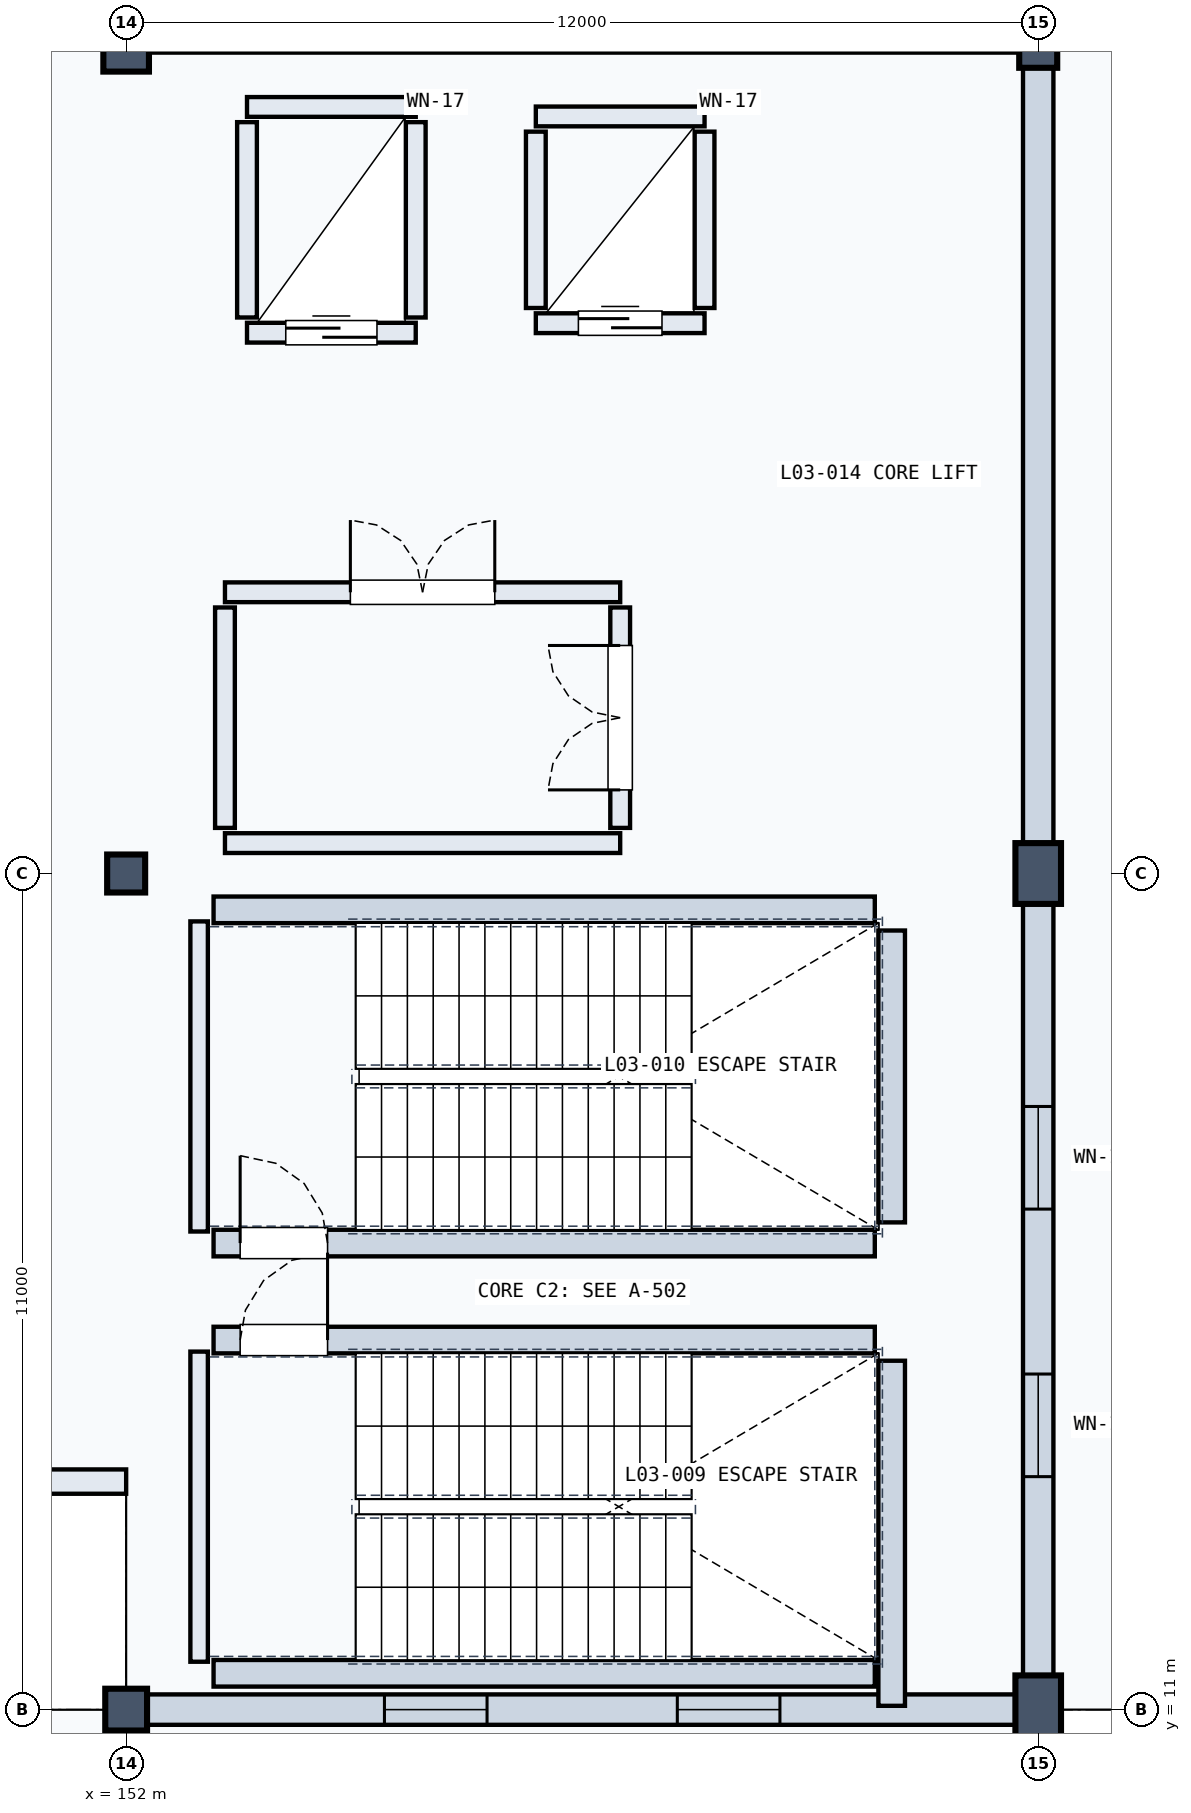
"""IFC4 building model, lengths in metres.
Left out: names, types, materials, properties, quantities, classifications, styles, units other than length and angle.
Written with IfcOpenShell. Run it as: python <this file> out.ifc"""

import sys

from ifc_helpers import new_model, si_unit, direction, frame, frame_2d, origin, origin_2d, place, context, subcontext, project, spatial, rectangle, extrude, element, fill, save


model = new_model("IFC4")
c1 = context("Model", 3, precision=1e-05, world=origin(), true_north=direction((0.0, 1.0)))
c2 = subcontext(c1, "Body", "Model", "MODEL_VIEW")
j1 = project(units=[si_unit("LENGTHUNIT", "METRE"), si_unit("PLANEANGLEUNIT", "RADIAN")], contexts=[c1])
p1 = place(None, origin())
s1 = spatial("IfcSite", under=j1, at=p1, CompositionType="ELEMENT")
p2 = place(p1, origin())
s2 = spatial("IfcBuilding", under=s1, at=p2, CompositionType="ELEMENT")
p3 = place(p2, frame((0.0, 0.0, 14.7)))
s3 = spatial("IfcBuildingStorey", under=s2, at=p3, CompositionType="ELEMENT", Elevation=14.7)
p4 = place(p3, frame((152.0, 11.0, 0.0), z_axis=(0.0, 0.0, 1.0), x_axis=(1.0, 0.0, 0.0)))
e1 = element("IfcColumn", 1, at=p4, inside=s3, PredefinedType="COLUMN", context=c2, shape_type="SweptSolid", body=[
    extrude(rectangle(XDim=0.55, YDim=0.55, at=origin_2d()), origin(), (0.0, 0.0, 1.0), 4.8),
])
p5 = place(p3, frame((152.0, 22.0, 0.0), z_axis=(0.0, 0.0, 1.0), x_axis=(1.0, 0.0, 0.0)))
e2 = element("IfcColumn", 2, at=p5, inside=s3, PredefinedType="COLUMN", context=c2, shape_type="SweptSolid", body=[
    extrude(rectangle(XDim=0.5, YDim=0.5, at=origin_2d()), origin(), (0.0, 0.0, 1.0), 4.8),
])
for number, where, z_axis, x_axis in (
    (3, (152.0, 33.0, 0.0), (0.0, 0.0, 1.0), (1.0, 0.0, 0.0)),
    (4, (164.0, 11.0, 0.0), (0.0, 0.0, 1.0), (1.0, 0.0, 0.0)),
):
    element("IfcColumn", number, at=place(p3, frame(where, z_axis=z_axis, x_axis=x_axis)), inside=s3, PredefinedType="COLUMN", context=c2, shape_type="SweptSolid", body=[
        extrude(rectangle(XDim=0.6, YDim=0.9, at=origin_2d()), origin(), (0.0, 0.0, 1.0), 4.8),
    ])
p6 = place(p3, frame((164.0, 22.0, 0.0), z_axis=(0.0, 0.0, 1.0), x_axis=(1.0, 0.0, 0.0)))
e5 = element("IfcColumn", 5, at=p6, inside=s3, PredefinedType="COLUMN", context=c2, shape_type="SweptSolid", body=[
    extrude(rectangle(XDim=0.6, YDim=0.8, at=origin_2d()), origin(), (0.0, 0.0, 1.0), 4.8),
])
p7 = place(p3, frame((164.0, 33.0, 0.0), z_axis=(0.0, 0.0, 1.0), x_axis=(1.0, 0.0, 0.0)))
e6 = element("IfcColumn", 6, at=p7, inside=s3, PredefinedType="COLUMN", context=c2, shape_type="SweptSolid", body=[
    extrude(rectangle(XDim=0.5, YDim=0.8, at=origin_2d()), origin(), (0.0, 0.0, 1.0), 4.8),
])
p8 = place(p3, frame((143.426, 14.0, 0.0), z_axis=(0.0, 0.0, 1.0), x_axis=(1.0, 0.0, 0.0)))
e7 = element("IfcWall", 7, at=p8, inside=s3, PredefinedType="SOLIDWALL", context=c2, shape_type="SweptSolid", body=[
    extrude(rectangle(XDim=8.574, YDim=0.32, at=frame_2d((4.287, 0.0))), origin(), (0.0, 0.0, 1.0), 3.778),
])
p9 = place(p8, frame((2.587, 0.0, 0.9)))
e8 = element("IfcOpeningElement", 8, at=p9, cuts=e7, PredefinedType="OPENING", context=c2, shape_type="SweptSolid", body=[
    extrude(rectangle(XDim=3.4, YDim=1.75, at=frame_2d((1.7, 0.875))), frame((0.0, 0.17, 0.0), z_axis=(0.0, -1.0, 0.0), x_axis=(1.0, 0.0, 0.0)), (0.0, 0.0, 1.0), 0.34),
])
p10 = place(p3, frame((152.22, 11.0, 0.0), z_axis=(0.0, 0.0, 1.0), x_axis=(1.0, 0.0, 0.0)))
e9 = element("IfcWall", 9, at=p10, inside=s3, PredefinedType="SOLIDWALL", context=c2, shape_type="SweptSolid", body=[
    extrude(rectangle(XDim=11.56, YDim=0.4, at=frame_2d((5.78, 0.0))), origin(), (0.0, 0.0, 1.0), 3.778),
])
p11 = place(p10, frame((3.178, 0.0, 0.8)))
e10 = element("IfcOpeningElement", 10, at=p11, cuts=e9, PredefinedType="OPENING", context=c2, shape_type="SweptSolid", body=[
    extrude(rectangle(XDim=1.35, YDim=2.1, at=frame_2d((0.675, 1.05))), frame((0.0, 0.21, 0.0), z_axis=(0.0, -1.0, 0.0), x_axis=(1.0, 0.0, 0.0)), (0.0, 0.0, 1.0), 0.42),
])
p12 = place(p10, frame((7.032, 0.0, 0.8)))
e11 = element("IfcOpeningElement", 11, at=p12, cuts=e9, PredefinedType="OPENING", context=c2, shape_type="SweptSolid", body=[
    extrude(rectangle(XDim=1.35, YDim=2.1, at=frame_2d((0.675, 1.05))), frame((0.0, 0.21, 0.0), z_axis=(0.0, -1.0, 0.0), x_axis=(1.0, 0.0, 0.0)), (0.0, 0.0, 1.0), 0.42),
])
p13 = place(p3, frame((164.0, 11.22, 0.0), z_axis=(0.0, 0.0, 1.0), x_axis=(0.0, 1.0, 0.0)))
e12 = element("IfcWall", 12, at=p13, inside=s3, PredefinedType="SOLIDWALL", context=c2, shape_type="SweptSolid", body=[
    extrude(rectangle(XDim=10.56, YDim=0.4, at=frame_2d((5.28, 0.0))), origin(), (0.0, 0.0, 1.0), 3.79),
])
p14 = place(p13, frame((2.845, 0.0, 0.8)))
e13 = element("IfcOpeningElement", 13, at=p14, cuts=e12, PredefinedType="OPENING", context=c2, shape_type="SweptSolid", body=[
    extrude(rectangle(XDim=1.35, YDim=2.1, at=frame_2d((0.675, 1.05))), frame((0.0, 0.21, 0.0), z_axis=(0.0, -1.0, 0.0), x_axis=(1.0, 0.0, 0.0)), (0.0, 0.0, 1.0), 0.42),
])
p15 = place(p13, frame((6.365, 0.0, 0.8)))
e14 = element("IfcOpeningElement", 14, at=p15, cuts=e12, PredefinedType="OPENING", context=c2, shape_type="SweptSolid", body=[
    extrude(rectangle(XDim=1.35, YDim=2.1, at=frame_2d((0.675, 1.05))), frame((0.0, 0.21, 0.0), z_axis=(0.0, -1.0, 0.0), x_axis=(1.0, 0.0, 0.0)), (0.0, 0.0, 1.0), 0.42),
])
p16 = place(p3, frame((152.22, 33.0, 0.0), z_axis=(0.0, 0.0, 1.0), x_axis=(1.0, 0.0, 0.0)))
e15 = element("IfcWall", 15, at=p16, inside=s3, PredefinedType="SOLIDWALL", context=c2, shape_type="SweptSolid", body=[
    extrude(rectangle(XDim=11.56, YDim=0.4, at=frame_2d((5.78, 0.0))), origin(), (0.0, 0.0, 1.0), 3.79),
])
p17 = place(p16, frame((3.178, 0.0, 0.8)))
e16 = element("IfcOpeningElement", 16, at=p17, cuts=e15, PredefinedType="OPENING", context=c2, shape_type="SweptSolid", body=[
    extrude(rectangle(XDim=1.35, YDim=2.1, at=frame_2d((0.675, 1.05))), frame((0.0, 0.21, 0.0), z_axis=(0.0, -1.0, 0.0), x_axis=(1.0, 0.0, 0.0)), (0.0, 0.0, 1.0), 0.42),
])
p18 = place(p16, frame((7.032, 0.0, 0.8)))
e17 = element("IfcOpeningElement", 17, at=p18, cuts=e15, PredefinedType="OPENING", context=c2, shape_type="SweptSolid", body=[
    extrude(rectangle(XDim=1.35, YDim=2.1, at=frame_2d((0.675, 1.05))), frame((0.0, 0.21, 0.0), z_axis=(0.0, -1.0, 0.0), x_axis=(1.0, 0.0, 0.0)), (0.0, 0.0, 1.0), 0.42),
])
p19 = place(p3, frame((164.0, 22.22, 0.0), z_axis=(0.0, 0.0, 1.0), x_axis=(0.0, 1.0, 0.0)))
e18 = element("IfcWall", 18, at=p19, inside=s3, PredefinedType="SOLIDWALL", context=c2, shape_type="SweptSolid", body=[
    extrude(rectangle(XDim=10.56, YDim=0.4, at=frame_2d((5.28, 0.0))), origin(), (0.0, 0.0, 1.0), 3.79),
])
p20 = place(p3, frame((152.96, 11.63, 0.0), z_axis=(0.0, 0.0, 1.0), x_axis=(0.0, 1.0, 0.0)))
e19 = element("IfcWall", 19, at=p20, inside=s3, PredefinedType="SOLIDWALL", context=c2, shape_type="SweptSolid", body=[
    extrude(rectangle(XDim=4.08, YDim=0.23, at=frame_2d((2.04, 0.0))), origin(), (0.0, 0.0, 1.0), 4.46),
])
p21 = place(p3, frame((162.072, 11.05, 0.0), z_axis=(0.0, 0.0, 1.0), x_axis=(0.0, 1.0, 0.0)))
e20 = element("IfcWall", 20, at=p21, inside=s3, PredefinedType="SOLIDWALL", context=c2, shape_type="SweptSolid", body=[
    extrude(rectangle(XDim=4.54, YDim=0.35, at=frame_2d((2.27, 0.0))), origin(), (0.0, 0.0, 1.0), 4.46),
])
p22 = place(p3, frame((153.15, 11.478, 0.0), z_axis=(0.0, 0.0, 1.0), x_axis=(1.0, 0.0, 0.0)))
e21 = element("IfcWall", 21, at=p22, inside=s3, PredefinedType="SOLIDWALL", context=c2, shape_type="SweptSolid", body=[
    extrude(rectangle(XDim=8.7, YDim=0.35, at=frame_2d((4.35, 0.0))), origin(), (0.0, 0.0, 1.0), 4.46),
])
p23 = place(p3, frame((153.15, 15.862, 0.0), z_axis=(0.0, 0.0, 1.0), x_axis=(1.0, 0.0, 0.0)))
e22 = element("IfcWall", 22, at=p23, inside=s3, PredefinedType="SOLIDWALL", context=c2, shape_type="SweptSolid", body=[
    extrude(rectangle(XDim=8.7, YDim=0.35, at=frame_2d((4.35, 0.0))), origin(), (0.0, 0.0, 1.0), 4.46),
])
p24 = place(p23, frame((0.35, 0.0, 0.0)))
e23 = element("IfcOpeningElement", 23, at=p24, cuts=e22, PredefinedType="OPENING", context=c2, shape_type="SweptSolid", body=[
    extrude(rectangle(XDim=1.15, YDim=2.2, at=frame_2d((0.575, 1.1))), frame((0.0, 0.185, 0.0), z_axis=(0.0, -1.0, 0.0), x_axis=(1.0, 0.0, 0.0)), (0.0, 0.0, 1.0), 0.37),
])
p25 = place(p3, frame((152.96, 17.29, 0.0), z_axis=(0.0, 0.0, 1.0), x_axis=(0.0, 1.0, 0.0)))
e24 = element("IfcWall", 24, at=p25, inside=s3, PredefinedType="SOLIDWALL", context=c2, shape_type="SweptSolid", body=[
    extrude(rectangle(XDim=4.08, YDim=0.23, at=frame_2d((2.04, 0.0))), origin(), (0.0, 0.0, 1.0), 4.46),
])
p26 = place(p3, frame((162.072, 17.41, 0.0), z_axis=(0.0, 0.0, 1.0), x_axis=(0.0, 1.0, 0.0)))
e25 = element("IfcWall", 25, at=p26, inside=s3, PredefinedType="SOLIDWALL", context=c2, shape_type="SweptSolid", body=[
    extrude(rectangle(XDim=3.84, YDim=0.35, at=frame_2d((1.92, 0.0))), origin(), (0.0, 0.0, 1.0), 4.46),
])
p27 = place(p3, frame((153.15, 17.138, 0.0), z_axis=(0.0, 0.0, 1.0), x_axis=(1.0, 0.0, 0.0)))
e26 = element("IfcWall", 26, at=p27, inside=s3, PredefinedType="SOLIDWALL", context=c2, shape_type="SweptSolid", body=[
    extrude(rectangle(XDim=8.7, YDim=0.35, at=frame_2d((4.35, 0.0))), origin(), (0.0, 0.0, 1.0), 4.46),
])
p28 = place(p27, frame((0.35, 0.0, 0.0)))
e27 = element("IfcOpeningElement", 27, at=p28, cuts=e26, PredefinedType="OPENING", context=c2, shape_type="SweptSolid", body=[
    extrude(rectangle(XDim=1.15, YDim=2.2, at=frame_2d((0.575, 1.1))), frame((0.0, 0.185, 0.0), z_axis=(0.0, -1.0, 0.0), x_axis=(1.0, 0.0, 0.0)), (0.0, 0.0, 1.0), 0.37),
])
p29 = place(p3, frame((153.15, 21.522, 0.0), z_axis=(0.0, 0.0, 1.0), x_axis=(1.0, 0.0, 0.0)))
e28 = element("IfcWall", 28, at=p29, inside=s3, PredefinedType="SOLIDWALL", context=c2, shape_type="SweptSolid", body=[
    extrude(rectangle(XDim=8.7, YDim=0.35, at=frame_2d((4.35, 0.0))), origin(), (0.0, 0.0, 1.0), 4.46),
])
p30 = place(p3, frame((153.59, 29.115, 0.0), z_axis=(0.0, 0.0, 1.0), x_axis=(1.0, 0.0, 0.0)))
e29 = element("IfcWall", 29, at=p30, inside=s3, PredefinedType="SOLIDWALL", context=c2, shape_type="SweptSolid", body=[
    extrude(rectangle(XDim=2.22, YDim=0.26, at=frame_2d((1.11, 0.0))), origin(), (0.0, 0.0, 1.0), 4.46),
])
p31 = place(p30, frame((0.51, 0.0, 0.0)))
e30 = element("IfcOpeningElement", 30, at=p31, cuts=e29, PredefinedType="OPENING", context=c2, shape_type="SweptSolid", body=[
    extrude(rectangle(XDim=1.2, YDim=2.2, at=frame_2d((0.6, 1.1))), frame((0.0, 0.14, 0.0), z_axis=(0.0, -1.0, 0.0), x_axis=(1.0, 0.0, 0.0)), (0.0, 0.0, 1.0), 0.28),
])
p32 = place(p3, frame((153.59, 32.085, 0.0), z_axis=(0.0, 0.0, 1.0), x_axis=(1.0, 0.0, 0.0)))
e31 = element("IfcWall", 31, at=p32, inside=s3, PredefinedType="SOLIDWALL", context=c2, shape_type="SweptSolid", body=[
    extrude(rectangle(XDim=2.22, YDim=0.26, at=frame_2d((1.11, 0.0))), origin(), (0.0, 0.0, 1.0), 4.46),
])
for number, where, z_axis, x_axis in (
    (32, (153.59, 29.315, 0.0), (0.0, 0.0, 1.0), (0.0, 1.0, 0.0)),
    (33, (155.81, 29.315, 0.0), (0.0, 0.0, 1.0), (0.0, 1.0, 0.0)),
):
    element("IfcWall", number, at=place(p3, frame(where, z_axis=z_axis, x_axis=x_axis)), inside=s3, PredefinedType="SOLIDWALL", context=c2, shape_type="SweptSolid", body=[
        extrude(rectangle(XDim=2.57, YDim=0.26, at=frame_2d((1.285, 0.0))), origin(), (0.0, 0.0, 1.0), 4.46),
    ])
p33 = place(p3, frame((157.39, 29.24, 0.0), z_axis=(0.0, 0.0, 1.0), x_axis=(1.0, 0.0, 0.0)))
e34 = element("IfcWall", 34, at=p33, inside=s3, PredefinedType="SOLIDWALL", context=c2, shape_type="SweptSolid", body=[
    extrude(rectangle(XDim=2.22, YDim=0.26, at=frame_2d((1.11, 0.0))), origin(), (0.0, 0.0, 1.0), 4.46),
])
p34 = place(p33, frame((0.56, 0.0, 0.0)))
e35 = element("IfcOpeningElement", 35, at=p34, cuts=e34, PredefinedType="OPENING", context=c2, shape_type="SweptSolid", body=[
    extrude(rectangle(XDim=1.1, YDim=2.15, at=frame_2d((0.55, 1.075))), frame((0.0, 0.14, 0.0), z_axis=(0.0, -1.0, 0.0), x_axis=(1.0, 0.0, 0.0)), (0.0, 0.0, 1.0), 0.28),
])
p35 = place(p3, frame((157.39, 31.96, 0.0), z_axis=(0.0, 0.0, 1.0), x_axis=(1.0, 0.0, 0.0)))
e36 = element("IfcWall", 36, at=p35, inside=s3, PredefinedType="SOLIDWALL", context=c2, shape_type="SweptSolid", body=[
    extrude(rectangle(XDim=2.22, YDim=0.26, at=frame_2d((1.11, 0.0))), origin(), (0.0, 0.0, 1.0), 4.46),
])
for number, where, z_axis, x_axis in (
    (37, (157.39, 29.44, 0.0), (0.0, 0.0, 1.0), (0.0, 1.0, 0.0)),
    (38, (159.61, 29.44, 0.0), (0.0, 0.0, 1.0), (0.0, 1.0, 0.0)),
):
    element("IfcWall", number, at=place(p3, frame(where, z_axis=z_axis, x_axis=x_axis)), inside=s3, PredefinedType="SOLIDWALL", context=c2, shape_type="SweptSolid", body=[
        extrude(rectangle(XDim=2.32, YDim=0.26, at=frame_2d((1.16, 0.0))), origin(), (0.0, 0.0, 1.0), 4.46),
    ])
p36 = place(p3, frame((153.3, 25.7, 0.0), z_axis=(0.0, 0.0, 1.0), x_axis=(1.0, 0.0, 0.0)))
e39 = element("IfcWall", 39, at=p36, inside=s3, PredefinedType="SOLIDWALL", context=c2, shape_type="SweptSolid", body=[
    extrude(rectangle(XDim=5.2, YDim=0.26, at=frame_2d((2.6, 0.0))), origin(), (0.0, 0.0, 1.0), 4.46),
])
p37 = place(p36, frame((1.65, 0.0, 0.0)))
e40 = element("IfcOpeningElement", 40, at=p37, cuts=e39, PredefinedType="OPENING", context=c2, shape_type="SweptSolid", body=[
    extrude(rectangle(XDim=1.9, YDim=2.2, at=frame_2d((0.95, 1.1))), frame((0.0, 0.14, 0.0), z_axis=(0.0, -1.0, 0.0), x_axis=(1.0, 0.0, 0.0)), (0.0, 0.0, 1.0), 0.28),
])
p38 = place(p3, frame((153.3, 22.4, 0.0), z_axis=(0.0, 0.0, 1.0), x_axis=(1.0, 0.0, 0.0)))
e41 = element("IfcWall", 41, at=p38, inside=s3, PredefinedType="SOLIDWALL", context=c2, shape_type="SweptSolid", body=[
    extrude(rectangle(XDim=5.2, YDim=0.26, at=frame_2d((2.6, 0.0))), origin(), (0.0, 0.0, 1.0), 3.79),
])
p39 = place(p3, frame((153.3, 22.6, 0.0), z_axis=(0.0, 0.0, 1.0), x_axis=(0.0, 1.0, 0.0)))
e42 = element("IfcWall", 42, at=p39, inside=s3, PredefinedType="SOLIDWALL", context=c2, shape_type="SweptSolid", body=[
    extrude(rectangle(XDim=2.9, YDim=0.26, at=frame_2d((1.45, 0.0))), origin(), (0.0, 0.0, 1.0), 4.46),
])
p40 = place(p3, frame((158.5, 22.6, 0.0), z_axis=(0.0, 0.0, 1.0), x_axis=(0.0, 1.0, 0.0)))
e43 = element("IfcWall", 43, at=p40, inside=s3, PredefinedType="SOLIDWALL", context=c2, shape_type="SweptSolid", body=[
    extrude(rectangle(XDim=2.9, YDim=0.26, at=frame_2d((1.45, 0.0))), origin(), (0.0, 0.0, 1.0), 4.46),
])
p41 = place(p40, frame((0.5, 0.0, 0.0)))
e44 = element("IfcOpeningElement", 44, at=p41, cuts=e43, PredefinedType="OPENING", context=c2, shape_type="SweptSolid", body=[
    extrude(rectangle(XDim=1.9, YDim=2.2, at=frame_2d((0.95, 1.1))), frame((0.0, 0.14, 0.0), z_axis=(0.0, -1.0, 0.0), x_axis=(1.0, 0.0, 0.0)), (0.0, 0.0, 1.0), 0.28),
])
p42 = place(p11, origin())
e45 = element("IfcWindow", 45, at=p42, inside=s3, PartitioningType="SINGLE_PANEL", PredefinedType="WINDOW", context=c2, shape_type="SweptSolid", body=[
    extrude(rectangle(XDim=1.35, YDim=2.1, at=frame_2d((0.675, 1.05))), frame((0.0, 0.03, 0.0), z_axis=(0.0, -1.0, 0.0), x_axis=(1.0, 0.0, 0.0)), (0.0, 0.0, 1.0), 0.06),
])
fill(e10, e45)
p43 = place(p12, origin())
e46 = element("IfcWindow", 46, at=p43, inside=s3, PartitioningType="SINGLE_PANEL", PredefinedType="WINDOW", context=c2, shape_type="SweptSolid", body=[
    extrude(rectangle(XDim=1.35, YDim=2.1, at=frame_2d((0.675, 1.05))), frame((0.0, 0.03, 0.0), z_axis=(0.0, -1.0, 0.0), x_axis=(1.0, 0.0, 0.0)), (0.0, 0.0, 1.0), 0.06),
])
fill(e11, e46)
p44 = place(p14, origin())
e47 = element("IfcWindow", 47, at=p44, inside=s3, PartitioningType="SINGLE_PANEL", PredefinedType="WINDOW", context=c2, shape_type="SweptSolid", body=[
    extrude(rectangle(XDim=1.35, YDim=2.1, at=frame_2d((0.675, 1.05))), frame((0.0, 0.03, 0.0), z_axis=(0.0, -1.0, 0.0), x_axis=(1.0, 0.0, 0.0)), (0.0, 0.0, 1.0), 0.06),
])
fill(e13, e47)
p45 = place(p15, origin())
e48 = element("IfcWindow", 48, at=p45, inside=s3, PartitioningType="SINGLE_PANEL", PredefinedType="WINDOW", context=c2, shape_type="SweptSolid", body=[
    extrude(rectangle(XDim=1.35, YDim=2.1, at=frame_2d((0.675, 1.05))), frame((0.0, 0.03, 0.0), z_axis=(0.0, -1.0, 0.0), x_axis=(1.0, 0.0, 0.0)), (0.0, 0.0, 1.0), 0.06),
])
fill(e14, e48)
p46 = place(p24, origin())
e49 = element("IfcDoor", 49, at=p46, inside=s3, OperationType="SINGLE_SWING_RIGHT", PredefinedType="DOOR", context=c2, shape_type="SweptSolid", body=[
    extrude(rectangle(XDim=1.15, YDim=2.2, at=frame_2d((0.575, 1.1))), frame((0.0, 0.025, 0.0), z_axis=(0.0, -1.0, 0.0), x_axis=(1.0, 0.0, 0.0)), (0.0, 0.0, 1.0), 0.05),
])
fill(e23, e49)
p47 = place(p28, origin())
e50 = element("IfcDoor", 50, at=p47, inside=s3, OperationType="SINGLE_SWING_LEFT", PredefinedType="DOOR", context=c2, shape_type="SweptSolid", body=[
    extrude(rectangle(XDim=1.15, YDim=2.2, at=frame_2d((0.575, 1.1))), frame((0.0, 0.025, 0.0), z_axis=(0.0, -1.0, 0.0), x_axis=(1.0, 0.0, 0.0)), (0.0, 0.0, 1.0), 0.05),
])
fill(e27, e50)
p48 = place(p31, origin())
e51 = element("IfcDoor", 51, at=p48, inside=s3, OperationType="SLIDING_TO_LEFT", PredefinedType="DOOR", context=c2, shape_type="SweptSolid", body=[
    extrude(rectangle(XDim=1.2, YDim=2.2, at=frame_2d((0.6, 1.1))), frame((0.0, 0.025, 0.0), z_axis=(0.0, -1.0, 0.0), x_axis=(1.0, 0.0, 0.0)), (0.0, 0.0, 1.0), 0.05),
])
fill(e30, e51)
p49 = place(p34, origin())
e52 = element("IfcDoor", 52, at=p49, inside=s3, OperationType="SLIDING_TO_LEFT", PredefinedType="DOOR", context=c2, shape_type="SweptSolid", body=[
    extrude(rectangle(XDim=1.1, YDim=2.15, at=frame_2d((0.55, 1.075))), frame((0.0, 0.025, 0.0), z_axis=(0.0, -1.0, 0.0), x_axis=(1.0, 0.0, 0.0)), (0.0, 0.0, 1.0), 0.05),
])
fill(e35, e52)
p50 = place(p37, origin())
e53 = element("IfcDoor", 53, at=p50, inside=s3, OperationType="DOUBLE_DOOR_SINGLE_SWING", PredefinedType="DOOR", context=c2, shape_type="SweptSolid", body=[
    extrude(rectangle(XDim=1.9, YDim=2.2, at=frame_2d((0.95, 1.1))), frame((0.0, 0.025, 0.0), z_axis=(0.0, -1.0, 0.0), x_axis=(1.0, 0.0, 0.0)), (0.0, 0.0, 1.0), 0.05),
])
fill(e40, e53)
p51 = place(p41, origin())
e54 = element("IfcDoor", 54, at=p51, inside=s3, OperationType="DOUBLE_DOOR_SINGLE_SWING", PredefinedType="DOOR", context=c2, shape_type="SweptSolid", body=[
    extrude(rectangle(XDim=1.9, YDim=2.2, at=frame_2d((0.95, 1.1))), frame((0.0, 0.025, 0.0), z_axis=(0.0, -1.0, 0.0), x_axis=(1.0, 0.0, 0.0)), (0.0, 0.0, 1.0), 0.05),
])
fill(e44, e54)
save(model, sys.argv[1])
